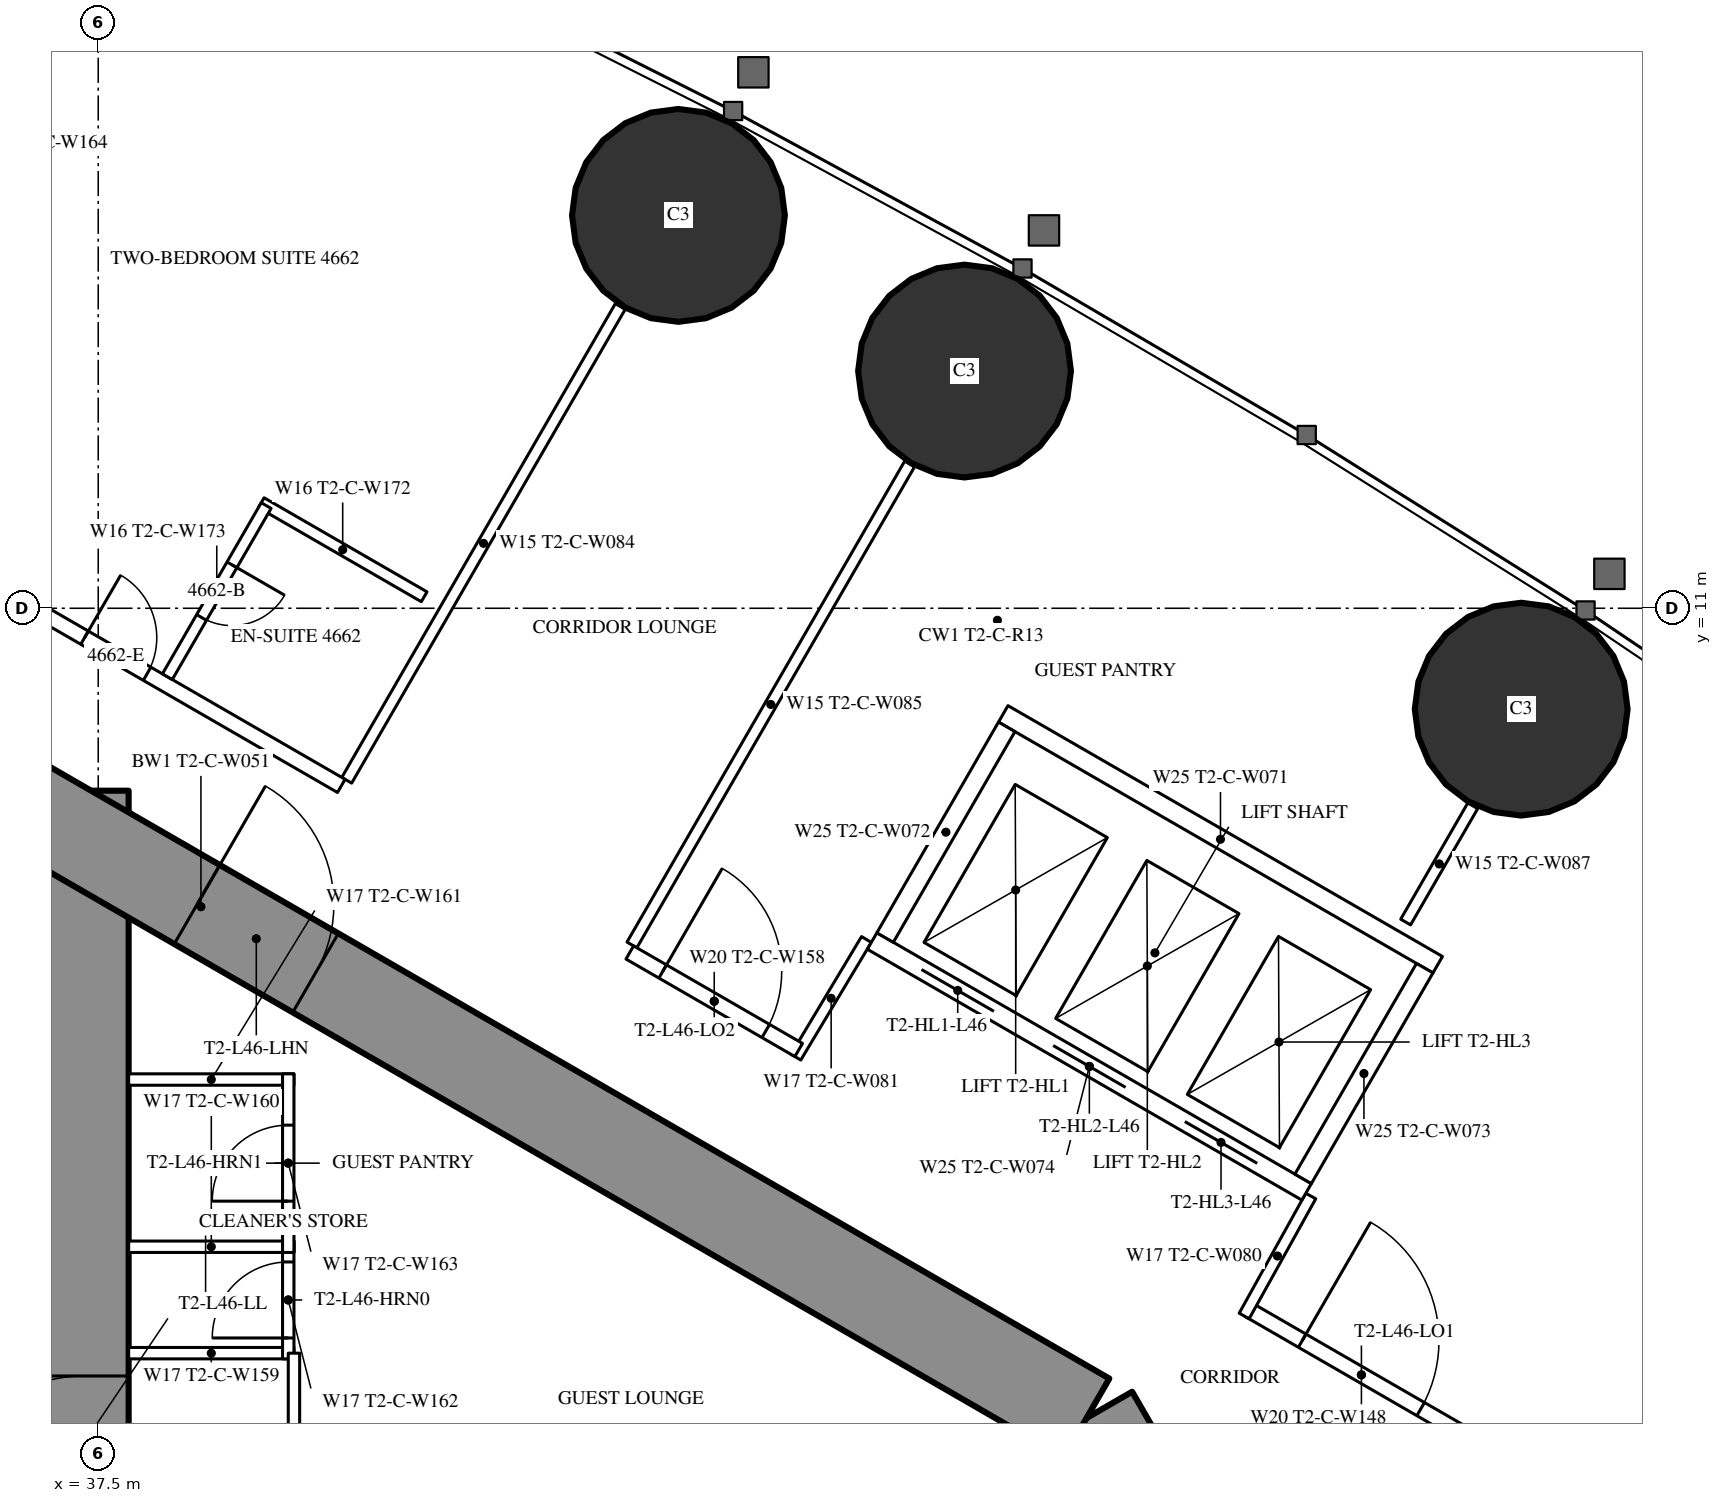
"""IFC4 building model, lengths in metres.
Left out: names, types, materials, properties, quantities, classifications, styles, units other than length and angle.
Written with IfcOpenShell. Run it as: python <this file> out.ifc"""

import sys

from ifc_helpers import new_model, si_unit, direction, frame, frame_2d, origin, origin_2d, place, context, subcontext, project, spatial, rectangle, circle, extrude, element, fill, save


model = new_model("IFC4")
c1 = context("Model", 3, precision=1e-05, world=origin(), true_north=direction((0.0, 1.0)))
c2 = subcontext(c1, "Body", "Model", "MODEL_VIEW")
j1 = project(units=[si_unit("LENGTHUNIT", "METRE"), si_unit("PLANEANGLEUNIT", "RADIAN")], contexts=[c1])
p1 = place(None, origin())
s1 = spatial("IfcSite", under=j1, at=p1, CompositionType="ELEMENT")
p2 = place(p1, origin())
s2 = spatial("IfcBuilding", under=s1, at=p2, CompositionType="ELEMENT")
p3 = place(p2, frame((0.0, 0.0, 173.8)))
s3 = spatial("IfcBuildingStorey", under=s2, at=p3, CompositionType="ELEMENT", Elevation=173.8)
for number, where, z_axis, x_axis in (
    (1, (56.221, 9.672, 0.0), (0.0, 0.0, 1.0), (1.0, 0.0, 0.0)),
    (2, (48.897, 14.121, 0.0), (0.0, 0.0, 1.0), (1.0, 0.0, 0.0)),
    (3, (45.134, 16.168, 0.0), (0.0, 0.0, 1.0), (1.0, 0.0, 0.0)),
):
    element("IfcColumn", number, at=place(p3, frame(where, z_axis=z_axis, x_axis=x_axis)), inside=s3, PredefinedType="COLUMN", context=c2, shape_type="SweptSolid", body=[
        extrude(circle(Radius=1.4, at=origin_2d()), origin(), (0.0, 0.0, 1.0), 3.5),
    ])
p4 = place(p3, frame((37.3, -8.6, 0.0), z_axis=(0.0, 0.0, 1.0), x_axis=(0.0, 1.0, 0.0)))
e4 = element("IfcWall", 4, at=p4, inside=s3, PredefinedType="SHEAR", context=c2, shape_type="SweptSolid", body=[
    extrude(rectangle(XDim=17.2, YDim=1.2, at=frame_2d((8.6, 0.0))), origin(), (0.0, 0.0, 1.0), 3.5),
])
p5 = place(p4, frame((7.7, 0.0, 0.0)))
e5 = element("IfcOpeningElement", 5, at=p5, cuts=e4, PredefinedType="OPENING", context=c2, shape_type="SweptSolid", body=[
    extrude(rectangle(XDim=1.8, YDim=2.2, at=frame_2d((0.9, 1.1))), frame((0.0, 0.61, 0.0), z_axis=(0.0, -1.0, 0.0), x_axis=(1.0, 0.0, 0.0)), (0.0, 0.0, 1.0), 1.22),
])
p6 = place(p3, frame((27.2, -13.8, 0.0), z_axis=(0.0, 0.0, 1.0), x_axis=(0.866027159892, 0.499996958321, 0.0)))
e6 = element("IfcWall", 6, at=p6, inside=s3, PredefinedType="SHEAR", context=c2, shape_type="SweptSolid", body=[
    extrude(rectangle(XDim=27.947, YDim=1.2, at=frame_2d((13.973, 0.0))), origin(), (0.0, 0.0, 1.0), 3.5),
])
p7 = place(p6, frame((4.6, 0.0, 0.0)))
e7 = element("IfcOpeningElement", 7, at=p7, cuts=e6, PredefinedType="OPENING", context=c2, shape_type="SweptSolid", body=[
    extrude(rectangle(XDim=1.0, YDim=2.2, at=frame_2d((0.5, 1.1))), frame((0.0, 0.61, 0.0), z_axis=(0.0, -1.0, 0.0), x_axis=(1.0, 0.0, 0.0)), (0.0, 0.0, 1.0), 1.22),
])
p8 = place(p6, frame((13.395, 0.0, 0.0)))
e8 = element("IfcOpeningElement", 8, at=p8, cuts=e6, PredefinedType="OPENING", context=c2, shape_type="SweptSolid", body=[
    extrude(rectangle(XDim=1.8, YDim=2.2, at=frame_2d((0.9, 1.1))), frame((0.0, 0.61, 0.0), z_axis=(0.0, -1.0, 0.0), x_axis=(1.0, 0.0, 0.0)), (0.0, 0.0, 1.0), 1.22),
])
p9 = place(p3, frame((27.2, 13.8, 0.0), z_axis=(0.0, 0.0, 1.0), x_axis=(0.866024515034, -0.500001539357, 0.0)))
e9 = element("IfcWall", 9, at=p9, inside=s3, PredefinedType="SHEAR", context=c2, shape_type="SweptSolid", body=[
    extrude(rectangle(XDim=26.907, YDim=1.2, at=frame_2d((13.454, 0.0))), origin(), (0.0, 0.0, 1.0), 3.5),
])
p10 = place(p9, frame((4.6, 0.0, 0.0)))
e10 = element("IfcOpeningElement", 10, at=p10, cuts=e9, PredefinedType="OPENING", context=c2, shape_type="SweptSolid", body=[
    extrude(rectangle(XDim=1.0, YDim=2.2, at=frame_2d((0.5, 1.1))), frame((0.0, 0.61, 0.0), z_axis=(0.0, -1.0, 0.0), x_axis=(1.0, 0.0, 0.0)), (0.0, 0.0, 1.0), 1.22),
])
p11 = place(p9, frame((13.395, 0.0, 0.0)))
e11 = element("IfcOpeningElement", 11, at=p11, cuts=e9, PredefinedType="OPENING", context=c2, shape_type="SweptSolid", body=[
    extrude(rectangle(XDim=1.8, YDim=2.2, at=frame_2d((0.9, 1.1))), frame((0.0, 0.61, 0.0), z_axis=(0.0, -1.0, 0.0), x_axis=(1.0, 0.0, 0.0)), (0.0, 0.0, 1.0), 1.22),
])
p12 = place(p3, frame((33.284, 13.059, 0.0), z_axis=(0.0, 0.0, 1.0), x_axis=(0.499985904184, 0.866033541855, 0.0)))
e12 = element("IfcWall", 12, at=p12, inside=s3, PredefinedType="PARTITIONING", context=c2, shape_type="SweptSolid", body=[
    extrude(rectangle(XDim=9.385, YDim=0.15, at=frame_2d((4.693, 0.0))), origin(), (0.0, 0.0, 1.0), 3.25),
])
p13 = place(p3, frame((40.769, 8.737, 0.0), z_axis=(0.0, 0.0, 1.0), x_axis=(0.500013115284, 0.866017831539, 0.0)))
e13 = element("IfcWall", 13, at=p13, inside=s3, PredefinedType="PARTITIONING", context=c2, shape_type="SweptSolid", body=[
    extrude(rectangle(XDim=7.198, YDim=0.15, at=frame_2d((3.599, 0.0))), origin(), (0.0, 0.0, 1.0), 2.3),
])
p14 = place(p3, frame((44.521, 6.571, 0.0), z_axis=(0.0, 0.0, 1.0), x_axis=(0.500020376429, 0.866013639128, 0.0)))
e14 = element("IfcWall", 14, at=p14, inside=s3, PredefinedType="PARTITIONING", context=c2, shape_type="SweptSolid", body=[
    extrude(rectangle(XDim=7.306, YDim=0.15, at=frame_2d((3.653, 0.0))), origin(), (0.0, 0.0, 1.0), 2.3),
])
p15 = place(p3, frame((54.7, 6.872, 0.0), z_axis=(0.0, 0.0, 1.0), x_axis=(0.499989690894, 0.866031355668, 0.0)))
e15 = element("IfcWall", 15, at=p15, inside=s3, PredefinedType="PARTITIONING", context=c2, shape_type="SweptSolid", body=[
    extrude(rectangle(XDim=1.766, YDim=0.15, at=frame_2d((0.883, 0.0))), origin(), (0.0, 0.0, 1.0), 3.25),
])
p16 = place(p3, frame((52.639, 1.769, 0.0), z_axis=(0.0, 0.0, 1.0), x_axis=(0.866027340901, -0.4999966448, 0.0)))
e16 = element("IfcWall", 16, at=p16, inside=s3, PredefinedType="PARTITIONING", context=c2, shape_type="SweptSolid", body=[
    extrude(rectangle(XDim=3.417, YDim=0.2, at=frame_2d((1.708, 0.0))), origin(), (0.0, 0.0, 1.0), 3.25),
])
p17 = place(p16, frame((0.809, 0.0, 0.0)))
e17 = element("IfcOpeningElement", 17, at=p17, cuts=e16, PredefinedType="OPENING", context=c2, shape_type="SweptSolid", body=[
    extrude(rectangle(XDim=1.8, YDim=2.2, at=frame_2d((0.9, 1.1))), frame((0.0, 0.11, 0.0), z_axis=(0.0, -1.0, 0.0), x_axis=(1.0, 0.0, 0.0)), (0.0, 0.0, 1.0), 0.22),
])
p18 = place(p3, frame((52.576, 1.689, 0.0), z_axis=(0.0, 0.0, 1.0), x_axis=(0.485424724123, 0.874278466629, 0.0)))
e18 = element("IfcWall", 18, at=p18, inside=s3, PredefinedType="PARTITIONING", context=c2, shape_type="SweptSolid", body=[
    extrude(rectangle(XDim=1.805, YDim=0.15, at=frame_2d((0.903, 0.0))), origin(), (0.0, 0.0, 1.0), 3.25),
])
p19 = place(p3, frame((47.606, 6.643, 0.0), z_axis=(0.0, 0.0, 1.0), x_axis=(-0.514237157483, -0.857648031458, 0.0)))
e19 = element("IfcWall", 19, at=p19, inside=s3, PredefinedType="PARTITIONING", context=c2, shape_type="SweptSolid", body=[
    extrude(rectangle(XDim=1.805, YDim=0.15, at=frame_2d((0.902, 0.0))), origin(), (0.0, 0.0, 1.0), 3.25),
])
p20 = place(p3, frame((27.959, 16.017, 0.0), z_axis=(0.0, 0.0, 1.0), x_axis=(0.866024165033, -0.500002145574, 0.0)))
e20 = element("IfcWall", 20, at=p20, inside=s3, PredefinedType="PARTITIONING", context=c2, shape_type="SweptSolid", body=[
    extrude(rectangle(XDim=14.709, YDim=0.2, at=frame_2d((7.354, 0.0))), origin(), (0.0, 0.0, 1.0), 3.25),
])
p21 = place(p20, frame((10.809, 0.0, 0.0)))
e21 = element("IfcOpeningElement", 21, at=p21, cuts=e20, PredefinedType="OPENING", context=c2, shape_type="SweptSolid", body=[
    extrude(rectangle(XDim=0.95, YDim=2.2, at=frame_2d((0.475, 1.1))), frame((0.0, 0.11, 0.0), z_axis=(0.0, -1.0, 0.0), x_axis=(1.0, 0.0, 0.0)), (0.0, 0.0, 1.0), 0.22),
])
p22 = place(p20, frame((2.95, 0.0, 0.0)))
e22 = element("IfcOpeningElement", 22, at=p22, cuts=e20, PredefinedType="OPENING", context=c2, shape_type="SweptSolid", body=[
    extrude(rectangle(XDim=0.95, YDim=2.2, at=frame_2d((0.475, 1.1))), frame((0.0, 0.11, 0.0), z_axis=(0.0, -1.0, 0.0), x_axis=(1.0, 0.0, 0.0)), (0.0, 0.0, 1.0), 0.22),
])
p23 = place(p3, frame((44.493, 6.472, 0.0), z_axis=(0.0, 0.0, 1.0), x_axis=(0.866027140358, -0.499996992154, 0.0)))
e23 = element("IfcWall", 23, at=p23, inside=s3, PredefinedType="PARTITIONING", context=c2, shape_type="SweptSolid", body=[
    extrude(rectangle(XDim=2.566, YDim=0.2, at=frame_2d((1.283, 0.0))), origin(), (0.0, 0.0, 1.0), 3.25),
])
p24 = place(p23, frame((0.5, 0.0, 0.0)))
e24 = element("IfcOpeningElement", 24, at=p24, cuts=e23, PredefinedType="OPENING", context=c2, shape_type="SweptSolid", body=[
    extrude(rectangle(XDim=1.566, YDim=2.2, at=frame_2d((0.783, 1.1))), frame((0.0, 0.11, 0.0), z_axis=(0.0, -1.0, 0.0), x_axis=(1.0, 0.0, 0.0)), (0.0, 0.0, 1.0), 0.22),
])
p25 = place(p3, frame((39.645, 12.389, 0.0), z_axis=(0.0, 0.0, 1.0), x_axis=(0.866006523861, -0.500032699561, 0.0)))
e25 = element("IfcWall", 25, at=p25, inside=s3, PredefinedType="PARTITIONING", context=c2, shape_type="SweptSolid", body=[
    extrude(rectangle(XDim=2.475, YDim=0.15, at=frame_2d((1.237, 0.0))), origin(), (0.0, 0.0, 1.0), 3.25),
])
p26 = place(p3, frame((38.409, 10.099, 0.0), z_axis=(0.0, 0.0, 1.0), x_axis=(0.500006934395, 0.866021400173, 0.0)))
e26 = element("IfcWall", 26, at=p26, inside=s3, PredefinedType="PARTITIONING", context=c2, shape_type="SweptSolid", body=[
    extrude(rectangle(XDim=2.6, YDim=0.15, at=frame_2d((1.3, 0.0))), origin(), (0.0, 0.0, 1.0), 3.25),
])
p27 = place(p26, frame((0.9, 0.0, 0.0)))
e27 = element("IfcOpeningElement", 27, at=p27, cuts=e26, PredefinedType="OPENING", context=c2, shape_type="SweptSolid", body=[
    extrude(rectangle(XDim=0.8, YDim=2.2, at=frame_2d((0.4, 1.1))), frame((0.0, 0.085, 0.0), z_axis=(0.0, -1.0, 0.0), x_axis=(1.0, 0.0, 0.0)), (0.0, 0.0, 1.0), 0.17),
])
for number, where, z_axis, x_axis in (
    (28, (37.9, 1.2, 0.0), (0.0, 0.0, 1.0), (1.0, 0.0, 0.0)),
    (29, (37.9, 2.6, 0.0), (0.0, 0.0, 1.0), (1.0, 0.0, 0.0)),
    (30, (37.9, 4.8, 0.0), (0.0, 0.0, 1.0), (1.0, 0.0, 0.0)),
):
    element("IfcWall", number, at=place(p3, frame(where, z_axis=z_axis, x_axis=x_axis)), inside=s3, PredefinedType="PARTITIONING", context=c2, shape_type="SweptSolid", body=[
        extrude(rectangle(XDim=2.175, YDim=0.15, at=frame_2d((1.087, 0.0))), origin(), (0.0, 0.0, 1.0), 3.25),
    ])
p28 = place(p3, frame((40.0, 1.125, 0.0), z_axis=(0.0, 0.0, 1.0), x_axis=(0.0, 1.0, 0.0)))
e31 = element("IfcWall", 31, at=p28, inside=s3, PredefinedType="PARTITIONING", context=c2, shape_type="SweptSolid", body=[
    extrude(rectangle(XDim=1.55, YDim=0.15, at=frame_2d((0.775, 0.0))), origin(), (0.0, 0.0, 1.0), 3.25),
])
p29 = place(p28, frame((0.275, 0.0, 0.0)))
e32 = element("IfcOpeningElement", 32, at=p29, cuts=e31, PredefinedType="OPENING", context=c2, shape_type="SweptSolid", body=[
    extrude(rectangle(XDim=1.0, YDim=2.2, at=frame_2d((0.5, 1.1))), frame((0.0, 0.085, 0.0), z_axis=(0.0, -1.0, 0.0), x_axis=(1.0, 0.0, 0.0)), (0.0, 0.0, 1.0), 0.17),
])
p30 = place(p3, frame((40.0, 2.525, 0.0), z_axis=(0.0, 0.0, 1.0), x_axis=(0.0, 1.0, 0.0)))
e33 = element("IfcWall", 33, at=p30, inside=s3, PredefinedType="PARTITIONING", context=c2, shape_type="SweptSolid", body=[
    extrude(rectangle(XDim=2.35, YDim=0.15, at=frame_2d((1.175, 0.0))), origin(), (0.0, 0.0, 1.0), 3.25),
])
p31 = place(p30, frame((0.675, 0.0, 0.0)))
e34 = element("IfcOpeningElement", 34, at=p31, cuts=e33, PredefinedType="OPENING", context=c2, shape_type="SweptSolid", body=[
    extrude(rectangle(XDim=1.0, YDim=2.2, at=frame_2d((0.5, 1.1))), frame((0.0, 0.085, 0.0), z_axis=(0.0, -1.0, 0.0), x_axis=(1.0, 0.0, 0.0)), (0.0, 0.0, 1.0), 0.17),
])
p32 = place(p3, frame((40.075, -5.674, 0.0), z_axis=(0.0, 0.0, 1.0), x_axis=(0.0, 1.0, 0.0)))
e35 = element("IfcWall", 35, at=p32, inside=s3, PredefinedType="PARTITIONING", context=c2, shape_type="SweptSolid", body=[
    extrude(rectangle(XDim=6.874, YDim=0.15, at=frame_2d((3.437, 0.0))), origin(), (0.0, 0.0, 1.0), 3.25),
])
p33 = place(p32, frame((2.537, 0.0, 0.0)))
e36 = element("IfcOpeningElement", 36, at=p33, cuts=e35, PredefinedType="OPENING", context=c2, shape_type="SweptSolid", body=[
    extrude(rectangle(XDim=1.8, YDim=2.2, at=frame_2d((0.9, 1.1))), frame((0.0, 0.085, 0.0), z_axis=(0.0, -1.0, 0.0), x_axis=(1.0, 0.0, 0.0)), (0.0, 0.0, 1.0), 0.17),
])
p34 = place(p3, frame((47.681, 6.622, 0.0), z_axis=(0.0, 0.0, 1.0), x_axis=(0.86603344179, -0.499986077507, 0.0)))
e37 = element("IfcWall", 37, at=p34, inside=s3, PredefinedType="PARTITIONING", context=c2, shape_type="SweptSolid", body=[
    extrude(rectangle(XDim=6.6, YDim=0.25, at=frame_2d((3.3, 0.0))), origin(), (0.0, 0.0, 1.0), 3.25),
])
p35 = place(p34, frame((0.75, 0.0, 0.0)))
e38 = element("IfcOpeningElement", 38, at=p35, cuts=e37, PredefinedType="OPENING", context=c2, shape_type="SweptSolid", body=[
    extrude(rectangle(XDim=1.1, YDim=2.2, at=frame_2d((0.55, 1.1))), frame((0.0, 0.135, 0.0), z_axis=(0.0, -1.0, 0.0), x_axis=(1.0, 0.0, 0.0)), (0.0, 0.0, 1.0), 0.27),
])
p36 = place(p34, frame((2.75, 0.0, 0.0)))
e39 = element("IfcOpeningElement", 39, at=p36, cuts=e37, PredefinedType="OPENING", context=c2, shape_type="SweptSolid", body=[
    extrude(rectangle(XDim=1.1, YDim=2.2, at=frame_2d((0.55, 1.1))), frame((0.0, 0.135, 0.0), z_axis=(0.0, -1.0, 0.0), x_axis=(1.0, 0.0, 0.0)), (0.0, 0.0, 1.0), 0.27),
])
p37 = place(p34, frame((4.75, 0.0, 0.0)))
e40 = element("IfcOpeningElement", 40, at=p37, cuts=e37, PredefinedType="OPENING", context=c2, shape_type="SweptSolid", body=[
    extrude(rectangle(XDim=1.1, YDim=2.2, at=frame_2d((0.55, 1.1))), frame((0.0, 0.135, 0.0), z_axis=(0.0, -1.0, 0.0), x_axis=(1.0, 0.0, 0.0)), (0.0, 0.0, 1.0), 0.27),
])
p38 = place(p3, frame((49.406, 9.611, 0.0), z_axis=(0.0, 0.0, 1.0), x_axis=(0.86603344179, -0.499986077507, 0.0)))
e41 = element("IfcWall", 41, at=p38, inside=s3, PredefinedType="PARTITIONING", context=c2, shape_type="SweptSolid", body=[
    extrude(rectangle(XDim=6.6, YDim=0.25, at=frame_2d((3.3, 0.0))), origin(), (0.0, 0.0, 1.0), 3.25),
])
p39 = place(p3, frame((47.852, 6.668, 0.0), z_axis=(0.0, 0.0, 1.0), x_axis=(0.499929347863, 0.866066190972, 0.0)))
e42 = element("IfcWall", 42, at=p39, inside=s3, PredefinedType="PARTITIONING", context=c2, shape_type="SweptSolid", body=[
    extrude(rectangle(XDim=3.201, YDim=0.25, at=frame_2d((1.6, 0.0))), origin(), (0.0, 0.0, 1.0), 3.25),
])
p40 = place(p3, frame((53.352, 3.493, 0.0), z_axis=(0.0, 0.0, 1.0), x_axis=(0.499872130319, 0.866099216793, 0.0)))
e43 = element("IfcWall", 43, at=p40, inside=s3, PredefinedType="PARTITIONING", context=c2, shape_type="SweptSolid", body=[
    extrude(rectangle(XDim=3.2, YDim=0.25, at=frame_2d((1.6, 0.0))), origin(), (0.0, 0.0, 1.0), 3.25),
])
p41 = place(p27, origin())
e44 = element("IfcDoor", 44, at=p41, inside=s3, OperationType="SINGLE_SWING_RIGHT", PredefinedType="DOOR", context=c2, shape_type="SweptSolid", body=[
    extrude(rectangle(XDim=0.8, YDim=2.2, at=frame_2d((0.4, 1.1))), frame((0.0, 0.025, 0.0), z_axis=(0.0, -1.0, 0.0), x_axis=(1.0, 0.0, 0.0)), (0.0, 0.0, 1.0), 0.05),
])
fill(e27, e44)
p42 = place(p21, origin())
e45 = element("IfcDoor", 45, at=p42, inside=s3, OperationType="SINGLE_SWING_LEFT", PredefinedType="DOOR", context=c2, shape_type="SweptSolid", body=[
    extrude(rectangle(XDim=0.95, YDim=2.2, at=frame_2d((0.475, 1.1))), frame((0.0, 0.025, 0.0), z_axis=(0.0, -1.0, 0.0), x_axis=(1.0, 0.0, 0.0)), (0.0, 0.0, 1.0), 0.05),
])
fill(e21, e45)
p43 = place(p17, origin())
e46 = element("IfcDoor", 46, at=p43, inside=s3, OperationType="DOUBLE_DOOR_SINGLE_SWING", PredefinedType="DOOR", context=c2, shape_type="SweptSolid", body=[
    extrude(rectangle(XDim=1.8, YDim=2.2, at=frame_2d((0.9, 1.1))), frame((0.0, 0.025, 0.0), z_axis=(0.0, -1.0, 0.0), x_axis=(1.0, 0.0, 0.0)), (0.0, 0.0, 1.0), 0.05),
])
fill(e17, e46)
p44 = place(p24, origin())
e47 = element("IfcDoor", 47, at=p44, inside=s3, OperationType="SINGLE_SWING_LEFT", PredefinedType="DOOR", context=c2, shape_type="SweptSolid", body=[
    extrude(rectangle(XDim=1.566, YDim=2.2, at=frame_2d((0.783, 1.1))), frame((0.0, 0.025, 0.0), z_axis=(0.0, -1.0, 0.0), x_axis=(1.0, 0.0, 0.0)), (0.0, 0.0, 1.0), 0.05),
])
fill(e24, e47)
p45 = place(p29, origin())
e48 = element("IfcDoor", 48, at=p45, inside=s3, OperationType="SINGLE_SWING_LEFT", PredefinedType="DOOR", context=c2, shape_type="SweptSolid", body=[
    extrude(rectangle(XDim=1.0, YDim=2.2, at=frame_2d((0.5, 1.1))), frame((0.0, 0.025, 0.0), z_axis=(0.0, -1.0, 0.0), x_axis=(1.0, 0.0, 0.0)), (0.0, 0.0, 1.0), 0.05),
])
fill(e32, e48)
p46 = place(p31, origin())
e49 = element("IfcDoor", 49, at=p46, inside=s3, OperationType="SINGLE_SWING_LEFT", PredefinedType="DOOR", context=c2, shape_type="SweptSolid", body=[
    extrude(rectangle(XDim=1.0, YDim=2.2, at=frame_2d((0.5, 1.1))), frame((0.0, 0.025, 0.0), z_axis=(0.0, -1.0, 0.0), x_axis=(1.0, 0.0, 0.0)), (0.0, 0.0, 1.0), 0.05),
])
fill(e34, e49)
p47 = place(p11, origin())
e50 = element("IfcDoor", 50, at=p47, inside=s3, OperationType="DOUBLE_DOOR_SINGLE_SWING", PredefinedType="DOOR", context=c2, shape_type="SweptSolid", body=[
    extrude(rectangle(XDim=1.8, YDim=2.2, at=frame_2d((0.9, 1.1))), frame((0.0, 0.025, 0.0), z_axis=(0.0, -1.0, 0.0), x_axis=(1.0, 0.0, 0.0)), (0.0, 0.0, 1.0), 0.05),
])
fill(e11, e50)
p48 = place(p5, origin())
e51 = element("IfcDoor", 51, at=p48, inside=s3, OperationType="DOUBLE_DOOR_SINGLE_SWING", PredefinedType="DOOR", context=c2, shape_type="SweptSolid", body=[
    extrude(rectangle(XDim=1.8, YDim=2.2, at=frame_2d((0.9, 1.1))), frame((0.0, 0.025, 0.0), z_axis=(0.0, -1.0, 0.0), x_axis=(1.0, 0.0, 0.0)), (0.0, 0.0, 1.0), 0.05),
])
fill(e5, e51)
p49 = place(p35, origin())
e52 = element("IfcDoor", 52, at=p49, inside=s3, OperationType="DOUBLE_DOOR_SLIDING", PredefinedType="USERDEFINED", context=c2, shape_type="SweptSolid", body=[
    extrude(rectangle(XDim=1.1, YDim=2.2, at=frame_2d((0.55, 1.1))), frame((0.0, 0.025, 0.0), z_axis=(0.0, -1.0, 0.0), x_axis=(1.0, 0.0, 0.0)), (0.0, 0.0, 1.0), 0.05),
])
fill(e38, e52)
p50 = place(p36, origin())
e53 = element("IfcDoor", 53, at=p50, inside=s3, OperationType="DOUBLE_DOOR_SLIDING", PredefinedType="USERDEFINED", context=c2, shape_type="SweptSolid", body=[
    extrude(rectangle(XDim=1.1, YDim=2.2, at=frame_2d((0.55, 1.1))), frame((0.0, 0.025, 0.0), z_axis=(0.0, -1.0, 0.0), x_axis=(1.0, 0.0, 0.0)), (0.0, 0.0, 1.0), 0.05),
])
fill(e39, e53)
p51 = place(p37, origin())
e54 = element("IfcDoor", 54, at=p51, inside=s3, OperationType="DOUBLE_DOOR_SLIDING", PredefinedType="USERDEFINED", context=c2, shape_type="SweptSolid", body=[
    extrude(rectangle(XDim=1.1, YDim=2.2, at=frame_2d((0.55, 1.1))), frame((0.0, 0.025, 0.0), z_axis=(0.0, -1.0, 0.0), x_axis=(1.0, 0.0, 0.0)), (0.0, 0.0, 1.0), 0.05),
])
fill(e40, e54)
save(model, sys.argv[1])
